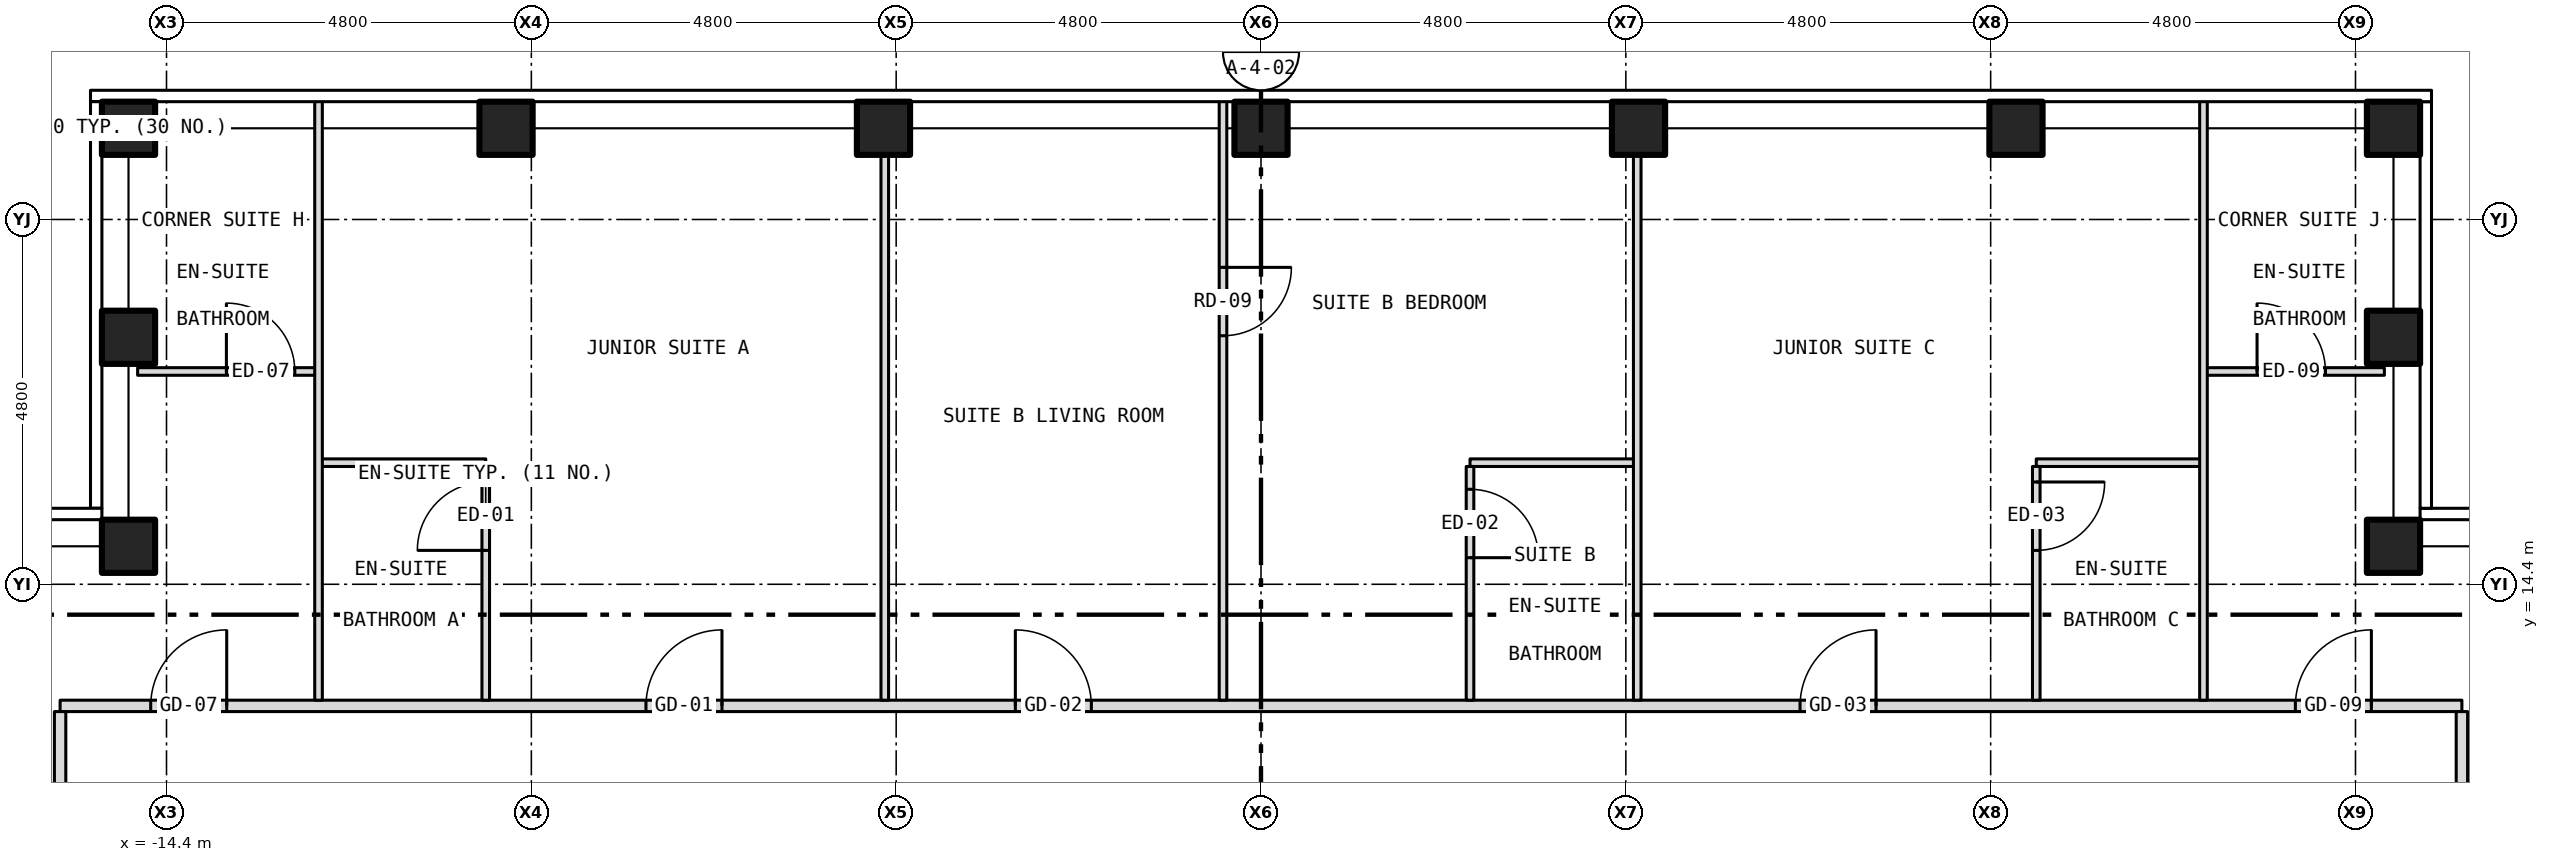
"""IFC4 building model, lengths in metres.
Left out: names, types, materials, properties, quantities, classifications, styles, units other than length and angle.
Written with IfcOpenShell. Run it as: python <this file> out.ifc"""

import sys

from ifc_helpers import new_model, si_unit, direction, frame, frame_2d, origin, origin_2d, place, context, subcontext, project, spatial, rectangle, hollow_rectangle, extrude, element, fill, save


model = new_model("IFC4")
c1 = context("Model", 3, precision=1e-05, world=origin(), true_north=direction((0.0, 1.0)))
c2 = subcontext(c1, "Body", "Model", "MODEL_VIEW")
j1 = project(units=[si_unit("LENGTHUNIT", "METRE"), si_unit("PLANEANGLEUNIT", "RADIAN")], contexts=[c1])
p1 = place(None, origin())
s1 = spatial("IfcSite", under=j1, at=p1, CompositionType="ELEMENT")
p2 = place(p1, origin())
s2 = spatial("IfcBuilding", under=s1, at=p2, CompositionType="ELEMENT")
p3 = place(p2, frame((0.0, 0.0, 194.5)))
s3 = spatial("IfcBuildingStorey", under=s2, at=p3, CompositionType="ELEMENT", Elevation=194.5)
for number, where, z_axis, x_axis in (
    (1, (-14.9, 20.4, -0.15), (0.0, 0.0, 1.0), (1.0, 0.0, 0.0)),
    (2, (-9.933, 20.4, -0.15), (0.0, 0.0, 1.0), (1.0, 0.0, 0.0)),
    (3, (-4.967, 20.4, -0.15), (0.0, 0.0, 1.0), (1.0, 0.0, 0.0)),
    (4, (0.0, 20.4, -0.15), (0.0, 0.0, 1.0), (1.0, 0.0, 0.0)),
    (5, (4.967, 20.4, -0.15), (0.0, 0.0, 1.0), (1.0, 0.0, 0.0)),
    (6, (9.933, 20.4, -0.15), (0.0, 0.0, 1.0), (1.0, 0.0, 0.0)),
    (7, (14.9, 20.4, -0.15), (0.0, 0.0, 1.0), (1.0, 0.0, 0.0)),
    (8, (-14.9, 14.9, -0.15), (0.0, 0.0, 1.0), (1.0, 0.0, 0.0)),
    (9, (-14.9, 17.65, -0.15), (0.0, 0.0, 1.0), (1.0, 0.0, 0.0)),
    (10, (14.9, 14.9, -0.15), (0.0, 0.0, 1.0), (1.0, 0.0, 0.0)),
    (11, (14.9, 17.65, -0.15), (0.0, 0.0, 1.0), (1.0, 0.0, 0.0)),
):
    element("IfcColumn", number, at=place(p3, frame(where, z_axis=z_axis, x_axis=x_axis)), inside=s3, PredefinedType="COLUMN", context=c2, shape_type="SweptSolid", body=[
        extrude(hollow_rectangle(XDim=0.7, YDim=0.7, WallThickness=0.04, at=origin_2d()), origin(), (0.0, 0.0, 1.0), 3.5),
    ])
p4 = place(p3, frame((-15.8, 12.8, 0.0), z_axis=(0.0, 0.0, 1.0), x_axis=(1.0, 0.0, 0.0)))
e12 = element("IfcWall", 12, at=p4, inside=s3, PredefinedType="PARTITIONING", context=c2, shape_type="SweptSolid", body=[
    extrude(rectangle(XDim=31.6, YDim=0.15, at=frame_2d((15.8, 0.0))), origin(), (0.0, 0.0, 1.0), 3.35),
])
p5 = place(p4, frame((7.708, 0.0, 0.0)))
e13 = element("IfcOpeningElement", 13, at=p5, cuts=e12, PredefinedType="OPENING", context=c2, shape_type="SweptSolid", body=[
    extrude(rectangle(XDim=1.0, YDim=2.1, at=frame_2d((0.5, 1.05))), frame((0.0, 0.087, 0.0), z_axis=(0.0, -1.0, 0.0), x_axis=(1.0, 0.0, 0.0)), (0.0, 0.0, 1.0), 0.174),
])
p6 = place(p4, frame((12.568, 0.0, 0.0)))
e14 = element("IfcOpeningElement", 14, at=p6, cuts=e12, PredefinedType="OPENING", context=c2, shape_type="SweptSolid", body=[
    extrude(rectangle(XDim=1.0, YDim=2.1, at=frame_2d((0.5, 1.05))), frame((0.0, 0.087, 0.0), z_axis=(0.0, -1.0, 0.0), x_axis=(1.0, 0.0, 0.0)), (0.0, 0.0, 1.0), 0.174),
])
p7 = place(p4, frame((22.892, 0.0, 0.0)))
e15 = element("IfcOpeningElement", 15, at=p7, cuts=e12, PredefinedType="OPENING", context=c2, shape_type="SweptSolid", body=[
    extrude(rectangle(XDim=1.0, YDim=2.1, at=frame_2d((0.5, 1.05))), frame((0.0, 0.087, 0.0), z_axis=(0.0, -1.0, 0.0), x_axis=(1.0, 0.0, 0.0)), (0.0, 0.0, 1.0), 0.174),
])
p8 = place(p4, frame((1.192, 0.0, 0.0)))
e16 = element("IfcOpeningElement", 16, at=p8, cuts=e12, PredefinedType="OPENING", context=c2, shape_type="SweptSolid", body=[
    extrude(rectangle(XDim=1.0, YDim=2.1, at=frame_2d((0.5, 1.05))), frame((0.0, 0.087, 0.0), z_axis=(0.0, -1.0, 0.0), x_axis=(1.0, 0.0, 0.0)), (0.0, 0.0, 1.0), 0.174),
])
p9 = place(p4, frame((29.409, 0.0, 0.0)))
e17 = element("IfcOpeningElement", 17, at=p9, cuts=e12, PredefinedType="OPENING", context=c2, shape_type="SweptSolid", body=[
    extrude(rectangle(XDim=1.0, YDim=2.1, at=frame_2d((0.5, 1.05))), frame((0.0, 0.087, 0.0), z_axis=(0.0, -1.0, 0.0), x_axis=(1.0, 0.0, 0.0)), (0.0, 0.0, 1.0), 0.174),
])
for number, where, z_axis, x_axis in (
    (18, (-12.4, 16.0, 0.0), (0.0, 0.0, 1.0), (1.0, 0.0, 0.0)),
    (19, (2.75, 16.0, 0.0), (0.0, 0.0, 1.0), (1.0, 0.0, 0.0)),
    (20, (10.2, 16.0, 0.0), (0.0, 0.0, 1.0), (1.0, 0.0, 0.0)),
):
    element("IfcWall", number, at=place(p3, frame(where, z_axis=z_axis, x_axis=x_axis)), inside=s3, PredefinedType="PARTITIONING", context=c2, shape_type="SweptSolid", body=[
        extrude(rectangle(XDim=2.2, YDim=0.1, at=frame_2d((1.1, 0.0))), origin(), (0.0, 0.0, 1.0), 3.35),
    ])
p10 = place(p3, frame((-14.78, 17.2, 0.0), z_axis=(0.0, 0.0, 1.0), x_axis=(1.0, 0.0, 0.0)))
e21 = element("IfcWall", 21, at=p10, inside=s3, PredefinedType="PARTITIONING", context=c2, shape_type="SweptSolid", body=[
    extrude(rectangle(XDim=2.38, YDim=0.1, at=frame_2d((1.19, 0.0))), origin(), (0.0, 0.0, 1.0), 3.35),
])
p11 = place(p10, frame((1.168, 0.0, 0.0)))
e22 = element("IfcOpeningElement", 22, at=p11, cuts=e21, PredefinedType="OPENING", context=c2, shape_type="SweptSolid", body=[
    extrude(rectangle(XDim=0.9, YDim=2.1, at=frame_2d((0.45, 1.05))), frame((0.0, 0.062, 0.0), z_axis=(0.0, -1.0, 0.0), x_axis=(1.0, 0.0, 0.0)), (0.0, 0.0, 1.0), 0.124),
])
p12 = place(p3, frame((12.4, 17.2, 0.0), z_axis=(0.0, 0.0, 1.0), x_axis=(1.0, 0.0, 0.0)))
e23 = element("IfcWall", 23, at=p12, inside=s3, PredefinedType="PARTITIONING", context=c2, shape_type="SweptSolid", body=[
    extrude(rectangle(XDim=2.38, YDim=0.1, at=frame_2d((1.19, 0.0))), origin(), (0.0, 0.0, 1.0), 3.35),
])
p13 = place(p12, frame((0.705, 0.0, 0.0)))
e24 = element("IfcOpeningElement", 24, at=p13, cuts=e23, PredefinedType="OPENING", context=c2, shape_type="SweptSolid", body=[
    extrude(rectangle(XDim=0.9, YDim=2.1, at=frame_2d((0.45, 1.05))), frame((0.0, 0.062, 0.0), z_axis=(0.0, -1.0, 0.0), x_axis=(1.0, 0.0, 0.0)), (0.0, 0.0, 1.0), 0.124),
])
p14 = place(p3, frame((-15.8, 10.92, 0.0), z_axis=(0.0, 0.0, 1.0), x_axis=(0.0, 1.0, 0.0)))
e25 = element("IfcWall", 25, at=p14, inside=s3, PredefinedType="PARTITIONING", context=c2, shape_type="SweptSolid", body=[
    extrude(rectangle(XDim=1.805, YDim=0.15, at=frame_2d((0.903, 0.0))), origin(), (0.0, 0.0, 1.0), 3.35),
])
p15 = place(p3, frame((-12.4, 12.875, 0.0), z_axis=(0.0, 0.0, 1.0), x_axis=(0.0, 1.0, 0.0)))
e26 = element("IfcWall", 26, at=p15, inside=s3, PredefinedType="PARTITIONING", context=c2, shape_type="SweptSolid", body=[
    extrude(rectangle(XDim=7.905, YDim=0.1, at=frame_2d((3.953, 0.0))), origin(), (0.0, 0.0, 1.0), 3.35),
])
p16 = place(p3, frame((-10.2, 12.875, 0.0), z_axis=(0.0, 0.0, 1.0), x_axis=(0.0, 1.0, 0.0)))
e27 = element("IfcWall", 27, at=p16, inside=s3, PredefinedType="PARTITIONING", context=c2, shape_type="SweptSolid", body=[
    extrude(rectangle(XDim=3.075, YDim=0.1, at=frame_2d((1.538, 0.0))), origin(), (0.0, 0.0, 1.0), 3.35),
])
p17 = place(p16, frame((1.971, 0.0, 0.0)))
e28 = element("IfcOpeningElement", 28, at=p17, cuts=e27, PredefinedType="OPENING", context=c2, shape_type="SweptSolid", body=[
    extrude(rectangle(XDim=0.9, YDim=2.1, at=frame_2d((0.45, 1.05))), frame((0.0, 0.062, 0.0), z_axis=(0.0, -1.0, 0.0), x_axis=(1.0, 0.0, 0.0)), (0.0, 0.0, 1.0), 0.124),
])
p18 = place(p3, frame((-4.95, 12.875, 0.0), z_axis=(0.0, 0.0, 1.0), x_axis=(0.0, 1.0, 0.0)))
e29 = element("IfcWall", 29, at=p18, inside=s3, PredefinedType="PARTITIONING", context=c2, shape_type="SweptSolid", body=[
    extrude(rectangle(XDim=7.405, YDim=0.1, at=frame_2d((3.703, 0.0))), origin(), (0.0, 0.0, 1.0), 2.817),
])
p19 = place(p3, frame((-0.5, 12.875, 0.0), z_axis=(0.0, 0.0, 1.0), x_axis=(0.0, 1.0, 0.0)))
e30 = element("IfcWall", 30, at=p19, inside=s3, PredefinedType="PARTITIONING", context=c2, shape_type="SweptSolid", body=[
    extrude(rectangle(XDim=7.905, YDim=0.1, at=frame_2d((3.953, 0.0))), origin(), (0.0, 0.0, 1.0), 3.35),
])
p20 = place(p19, frame((4.795, 0.0, 0.0)))
e31 = element("IfcOpeningElement", 31, at=p20, cuts=e30, PredefinedType="OPENING", context=c2, shape_type="SweptSolid", body=[
    extrude(rectangle(XDim=0.9, YDim=2.1, at=frame_2d((0.45, 1.05))), frame((0.0, 0.062, 0.0), z_axis=(0.0, -1.0, 0.0), x_axis=(1.0, 0.0, 0.0)), (0.0, 0.0, 1.0), 0.124),
])
p21 = place(p3, frame((2.75, 12.875, 0.0), z_axis=(0.0, 0.0, 1.0), x_axis=(0.0, 1.0, 0.0)))
e32 = element("IfcWall", 32, at=p21, inside=s3, PredefinedType="PARTITIONING", context=c2, shape_type="SweptSolid", body=[
    extrude(rectangle(XDim=3.075, YDim=0.1, at=frame_2d((1.538, 0.0))), origin(), (0.0, 0.0, 1.0), 3.35),
])
p22 = place(p21, frame((1.875, 0.0, 0.0)))
e33 = element("IfcOpeningElement", 33, at=p22, cuts=e32, PredefinedType="OPENING", context=c2, shape_type="SweptSolid", body=[
    extrude(rectangle(XDim=0.9, YDim=2.1, at=frame_2d((0.45, 1.05))), frame((0.0, 0.062, 0.0), z_axis=(0.0, -1.0, 0.0), x_axis=(1.0, 0.0, 0.0)), (0.0, 0.0, 1.0), 0.124),
])
p23 = place(p3, frame((4.95, 12.875, 0.0), z_axis=(0.0, 0.0, 1.0), x_axis=(0.0, 1.0, 0.0)))
e34 = element("IfcWall", 34, at=p23, inside=s3, PredefinedType="PARTITIONING", context=c2, shape_type="SweptSolid", body=[
    extrude(rectangle(XDim=7.405, YDim=0.1, at=frame_2d((3.703, 0.0))), origin(), (0.0, 0.0, 1.0), 2.817),
])
p24 = place(p3, frame((10.2, 12.875, 0.0), z_axis=(0.0, 0.0, 1.0), x_axis=(0.0, 1.0, 0.0)))
e35 = element("IfcWall", 35, at=p24, inside=s3, PredefinedType="PARTITIONING", context=c2, shape_type="SweptSolid", body=[
    extrude(rectangle(XDim=3.075, YDim=0.1, at=frame_2d((1.538, 0.0))), origin(), (0.0, 0.0, 1.0), 3.35),
])
p25 = place(p24, frame((1.971, 0.0, 0.0)))
e36 = element("IfcOpeningElement", 36, at=p25, cuts=e35, PredefinedType="OPENING", context=c2, shape_type="SweptSolid", body=[
    extrude(rectangle(XDim=0.9, YDim=2.1, at=frame_2d((0.45, 1.05))), frame((0.0, 0.062, 0.0), z_axis=(0.0, -1.0, 0.0), x_axis=(1.0, 0.0, 0.0)), (0.0, 0.0, 1.0), 0.124),
])
p26 = place(p3, frame((12.4, 12.875, 0.0), z_axis=(0.0, 0.0, 1.0), x_axis=(0.0, 1.0, 0.0)))
e37 = element("IfcWall", 37, at=p26, inside=s3, PredefinedType="PARTITIONING", context=c2, shape_type="SweptSolid", body=[
    extrude(rectangle(XDim=7.905, YDim=0.1, at=frame_2d((3.953, 0.0))), origin(), (0.0, 0.0, 1.0), 3.35),
])
p27 = place(p3, frame((15.8, 10.92, 0.0), z_axis=(0.0, 0.0, 1.0), x_axis=(0.0, 1.0, 0.0)))
e38 = element("IfcWall", 38, at=p27, inside=s3, PredefinedType="PARTITIONING", context=c2, shape_type="SweptSolid", body=[
    extrude(rectangle(XDim=1.805, YDim=0.15, at=frame_2d((0.903, 0.0))), origin(), (0.0, 0.0, 1.0), 3.35),
])
p28 = place(p5, origin())
e39 = element("IfcDoor", 39, at=p28, inside=s3, OperationType="SINGLE_SWING_RIGHT", PredefinedType="DOOR", context=c2, shape_type="SweptSolid", body=[
    extrude(rectangle(XDim=1.0, YDim=2.1, at=frame_2d((0.5, 1.05))), frame((0.0, 0.025, 0.0), z_axis=(0.0, -1.0, 0.0), x_axis=(1.0, 0.0, 0.0)), (0.0, 0.0, 1.0), 0.05),
])
fill(e13, e39)
p29 = place(p17, origin())
e40 = element("IfcDoor", 40, at=p29, inside=s3, OperationType="SINGLE_SWING_LEFT", PredefinedType="DOOR", context=c2, shape_type="SweptSolid", body=[
    extrude(rectangle(XDim=0.9, YDim=2.1, at=frame_2d((0.45, 1.05))), frame((0.0, 0.025, 0.0), z_axis=(0.0, -1.0, 0.0), x_axis=(1.0, 0.0, 0.0)), (0.0, 0.0, 1.0), 0.05),
])
fill(e28, e40)
p30 = place(p6, origin())
e41 = element("IfcDoor", 41, at=p30, inside=s3, OperationType="SINGLE_SWING_LEFT", PredefinedType="DOOR", context=c2, shape_type="SweptSolid", body=[
    extrude(rectangle(XDim=1.0, YDim=2.1, at=frame_2d((0.5, 1.05))), frame((0.0, 0.025, 0.0), z_axis=(0.0, -1.0, 0.0), x_axis=(1.0, 0.0, 0.0)), (0.0, 0.0, 1.0), 0.05),
])
fill(e14, e41)
p31 = place(p20, origin())
e42 = element("IfcDoor", 42, at=p31, inside=s3, OperationType="SINGLE_SWING_RIGHT", PredefinedType="DOOR", context=c2, shape_type="SweptSolid", body=[
    extrude(rectangle(XDim=0.9, YDim=2.1, at=frame_2d((0.45, 1.05))), frame((0.0, 0.025, 0.0), z_axis=(0.0, -1.0, 0.0), x_axis=(1.0, 0.0, 0.0)), (0.0, 0.0, 1.0), 0.05),
])
fill(e31, e42)
p32 = place(p22, origin())
e43 = element("IfcDoor", 43, at=p32, inside=s3, OperationType="SINGLE_SWING_LEFT", PredefinedType="DOOR", context=c2, shape_type="SweptSolid", body=[
    extrude(rectangle(XDim=0.9, YDim=2.1, at=frame_2d((0.45, 1.05))), frame((0.0, 0.025, 0.0), z_axis=(0.0, -1.0, 0.0), x_axis=(1.0, 0.0, 0.0)), (0.0, 0.0, 1.0), 0.05),
])
fill(e33, e43)
p33 = place(p7, origin())
e44 = element("IfcDoor", 44, at=p33, inside=s3, OperationType="SINGLE_SWING_RIGHT", PredefinedType="DOOR", context=c2, shape_type="SweptSolid", body=[
    extrude(rectangle(XDim=1.0, YDim=2.1, at=frame_2d((0.5, 1.05))), frame((0.0, 0.025, 0.0), z_axis=(0.0, -1.0, 0.0), x_axis=(1.0, 0.0, 0.0)), (0.0, 0.0, 1.0), 0.05),
])
fill(e15, e44)
p34 = place(p25, origin())
e45 = element("IfcDoor", 45, at=p34, inside=s3, OperationType="SINGLE_SWING_RIGHT", PredefinedType="DOOR", context=c2, shape_type="SweptSolid", body=[
    extrude(rectangle(XDim=0.9, YDim=2.1, at=frame_2d((0.45, 1.05))), frame((0.0, 0.025, 0.0), z_axis=(0.0, -1.0, 0.0), x_axis=(1.0, 0.0, 0.0)), (0.0, 0.0, 1.0), 0.05),
])
fill(e36, e45)
p35 = place(p11, origin())
e46 = element("IfcDoor", 46, at=p35, inside=s3, OperationType="SINGLE_SWING_LEFT", PredefinedType="DOOR", context=c2, shape_type="SweptSolid", body=[
    extrude(rectangle(XDim=0.9, YDim=2.1, at=frame_2d((0.45, 1.05))), frame((0.0, 0.025, 0.0), z_axis=(0.0, -1.0, 0.0), x_axis=(1.0, 0.0, 0.0)), (0.0, 0.0, 1.0), 0.05),
])
fill(e22, e46)
p36 = place(p8, origin())
e47 = element("IfcDoor", 47, at=p36, inside=s3, OperationType="SINGLE_SWING_RIGHT", PredefinedType="DOOR", context=c2, shape_type="SweptSolid", body=[
    extrude(rectangle(XDim=1.0, YDim=2.1, at=frame_2d((0.5, 1.05))), frame((0.0, 0.025, 0.0), z_axis=(0.0, -1.0, 0.0), x_axis=(1.0, 0.0, 0.0)), (0.0, 0.0, 1.0), 0.05),
])
fill(e16, e47)
p37 = place(p13, origin())
e48 = element("IfcDoor", 48, at=p37, inside=s3, OperationType="SINGLE_SWING_LEFT", PredefinedType="DOOR", context=c2, shape_type="SweptSolid", body=[
    extrude(rectangle(XDim=0.9, YDim=2.1, at=frame_2d((0.45, 1.05))), frame((0.0, 0.025, 0.0), z_axis=(0.0, -1.0, 0.0), x_axis=(1.0, 0.0, 0.0)), (0.0, 0.0, 1.0), 0.05),
])
fill(e24, e48)
p38 = place(p9, origin())
e49 = element("IfcDoor", 49, at=p38, inside=s3, OperationType="SINGLE_SWING_RIGHT", PredefinedType="DOOR", context=c2, shape_type="SweptSolid", body=[
    extrude(rectangle(XDim=1.0, YDim=2.1, at=frame_2d((0.5, 1.05))), frame((0.0, 0.025, 0.0), z_axis=(0.0, -1.0, 0.0), x_axis=(1.0, 0.0, 0.0)), (0.0, 0.0, 1.0), 0.05),
])
fill(e17, e49)
save(model, sys.argv[1])
